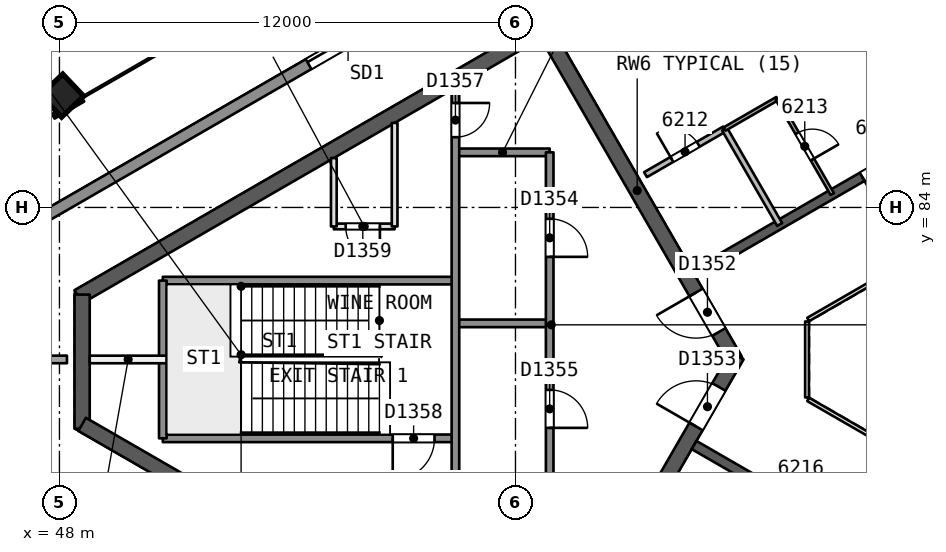
"""IFC4 building model, lengths in metres.
Left out: names, types, materials, properties, quantities, classifications, styles, units other than length and angle.
Written with IfcOpenShell. Run it as: python <this file> out.ifc"""

import sys

from ifc_helpers import new_model, si_unit, direction, frame, frame_2d, origin, origin_2d, place, context, subcontext, project, spatial, rectangle, extrude, element, fill, save


model = new_model("IFC4")
c1 = context("Model", 3, precision=1e-05, world=origin(), true_north=direction((0.0, 1.0)))
c2 = subcontext(c1, "Body", "Model", "MODEL_VIEW")
j1 = project(units=[si_unit("LENGTHUNIT", "METRE"), si_unit("PLANEANGLEUNIT", "RADIAN")], contexts=[c1])
p1 = place(None, origin())
s1 = spatial("IfcSite", under=j1, at=p1, CompositionType="ELEMENT")
p2 = place(p1, origin())
s2 = spatial("IfcBuilding", under=s1, at=p2, CompositionType="ELEMENT")
p3 = place(p2, frame((0.0, 0.0, 255.3)))
s3 = spatial("IfcBuildingStorey", under=s2, at=p3, CompositionType="ELEMENT", Elevation=255.3)
p4 = place(p3, frame((65.769, 80.0, 0.0), z_axis=(0.0, 0.0, 1.0), x_axis=(-0.50000177223, 0.866024380585, 0.0)))
e1 = element("IfcWall", 1, at=p4, inside=s3, PredefinedType="SHEAR", context=c2, shape_type="SweptSolid", body=[
    extrude(rectangle(XDim=10.265, YDim=0.4, at=frame_2d((5.132, 0.0))), origin(), (0.0, 0.0, 1.0), 3.7),
])
p5 = place(p4, frame((0.834, 0.0, 0.0)))
e2 = element("IfcOpeningElement", 2, at=p5, cuts=e1, PredefinedType="OPENING", context=c2, shape_type="SweptSolid", body=[
    extrude(rectangle(XDim=1.2, YDim=2.1, at=frame_2d((0.6, 1.05))), frame((0.0, 0.21, 0.0), z_axis=(0.0, -1.0, 0.0), x_axis=(1.0, 0.0, 0.0)), (0.0, 0.0, 1.0), 0.421),
])
p6 = place(p3, frame((60.737, 88.716, 0.0), z_axis=(0.0, 0.0, 1.0), x_axis=(-0.866028812667, -0.499994095595, 0.0)))
e3 = element("IfcWall", 3, at=p6, inside=s3, PredefinedType="SHEAR", context=c2, shape_type="SweptSolid", body=[
    extrude(rectangle(XDim=14.134, YDim=0.4, at=frame_2d((7.067, 0.0))), origin(), (0.0, 0.0, 1.0), 3.7),
])
p7 = place(p3, frame((48.597, 81.707, 0.0), z_axis=(0.0, 0.0, 1.0), x_axis=(0.0, -1.0, 0.0)))
e4 = element("IfcWall", 4, at=p7, inside=s3, PredefinedType="SHEAR", context=c2, shape_type="SweptSolid", body=[
    extrude(rectangle(XDim=3.53, YDim=0.4, at=frame_2d((1.765, 0.0))), origin(), (0.0, 0.0, 1.0), 3.7),
])
p8 = place(p3, frame((48.597, 78.293, 0.0), z_axis=(0.0, 0.0, 1.0), x_axis=(0.866026024469, -0.499998924941, 0.0)))
e5 = element("IfcWall", 5, at=p8, inside=s3, PredefinedType="SHEAR", context=c2, shape_type="SweptSolid", body=[
    extrude(rectangle(XDim=14.218, YDim=0.4, at=frame_2d((7.109, 0.0))), origin(), (0.0, 0.0, 1.0), 3.7),
])
p9 = place(p3, frame((60.737, 71.284, 0.0), z_axis=(0.0, 0.0, 1.0), x_axis=(0.50000547566, 0.866022242388, 0.0)))
e6 = element("IfcWall", 6, at=p9, inside=s3, PredefinedType="SHEAR", context=c2, shape_type="SweptSolid", body=[
    extrude(rectangle(XDim=10.18, YDim=0.4, at=frame_2d((5.09, 0.0))), origin(), (0.0, 0.0, 1.0), 3.7),
])
p10 = place(p9, frame((8.03, 0.0, 0.0)))
e7 = element("IfcOpeningElement", 7, at=p10, cuts=e6, PredefinedType="OPENING", context=c2, shape_type="SweptSolid", body=[
    extrude(rectangle(XDim=1.2, YDim=2.1, at=frame_2d((0.6, 1.05))), frame((0.0, 0.21, 0.0), z_axis=(0.0, -1.0, 0.0), x_axis=(1.0, 0.0, 0.0)), (0.0, 0.0, 1.0), 0.421),
])
p11 = place(p3, frame((78.2, 90.046, 0.0), z_axis=(0.0, 0.0, 1.0), x_axis=(-0.866026492143, -0.499998114903, 0.0)))
e8 = element("IfcWall", 8, at=p11, inside=s3, PredefinedType="SHEAR", context=c2, shape_type="SweptSolid", body=[
    extrude(rectangle(XDim=15.588, YDim=0.25, at=frame_2d((7.794, 0.0))), origin(), (0.0, 0.0, 1.0), 3.3),
])
p12 = place(p11, frame((5.887, 0.0, 0.0)))
e9 = element("IfcOpeningElement", 9, at=p12, cuts=e8, PredefinedType="OPENING", context=c2, shape_type="SweptSolid", body=[
    extrude(rectangle(XDim=1.0, YDim=2.1, at=frame_2d((0.5, 1.05))), frame((0.0, 0.135, 0.0), z_axis=(0.0, -1.0, 0.0), x_axis=(1.0, 0.0, 0.0)), (0.0, 0.0, 1.0), 0.271),
])
p13 = place(p11, frame((9.481, 0.0, 0.0)))
e10 = element("IfcOpeningElement", 10, at=p13, cuts=e8, PredefinedType="OPENING", context=c2, shape_type="SweptSolid", body=[
    extrude(rectangle(XDim=1.0, YDim=2.1, at=frame_2d((0.5, 1.05))), frame((0.0, 0.135, 0.0), z_axis=(0.0, -1.0, 0.0), x_axis=(1.0, 0.0, 0.0)), (0.0, 0.0, 1.0), 0.271),
])
p14 = place(p3, frame((64.7, 77.748, 0.0), z_axis=(0.0, 0.0, 1.0), x_axis=(0.866026492143, -0.499998114903, 0.0)))
e11 = element("IfcWall", 11, at=p14, inside=s3, PredefinedType="SHEAR", context=c2, shape_type="SweptSolid", body=[
    extrude(rectangle(XDim=15.588, YDim=0.25, at=frame_2d((7.794, 0.0))), origin(), (0.0, 0.0, 1.0), 3.3),
])
p15 = place(p14, frame((2.747, 0.0, 0.0)))
e12 = element("IfcOpeningElement", 12, at=p15, cuts=e11, PredefinedType="OPENING", context=c2, shape_type="SweptSolid", body=[
    extrude(rectangle(XDim=1.0, YDim=2.1, at=frame_2d((0.5, 1.05))), frame((0.0, 0.135, 0.0), z_axis=(0.0, -1.0, 0.0), x_axis=(1.0, 0.0, 0.0)), (0.0, 0.0, 1.0), 0.271),
])
p16 = place(p14, frame((6.544, 0.0, 0.0)))
e13 = element("IfcOpeningElement", 13, at=p16, cuts=e11, PredefinedType="OPENING", context=c2, shape_type="SweptSolid", body=[
    extrude(rectangle(XDim=1.0, YDim=2.1, at=frame_2d((0.5, 1.05))), frame((0.0, 0.135, 0.0), z_axis=(0.0, -1.0, 0.0), x_axis=(1.0, 0.0, 0.0)), (0.0, 0.0, 1.0), 0.271),
])
p17 = place(p14, frame((10.441, 0.0, 0.0)))
e14 = element("IfcOpeningElement", 14, at=p17, cuts=e11, PredefinedType="OPENING", context=c2, shape_type="SweptSolid", body=[
    extrude(rectangle(XDim=1.0, YDim=2.1, at=frame_2d((0.5, 1.05))), frame((0.0, 0.135, 0.0), z_axis=(0.0, -1.0, 0.0), x_axis=(1.0, 0.0, 0.0)), (0.0, 0.0, 1.0), 0.271),
])
p18 = place(p14, frame((11.841, 0.0, 0.0)))
e15 = element("IfcOpeningElement", 15, at=p18, cuts=e11, PredefinedType="OPENING", context=c2, shape_type="SweptSolid", body=[
    extrude(rectangle(XDim=1.0, YDim=2.1, at=frame_2d((0.5, 1.05))), frame((0.0, 0.135, 0.0), z_axis=(0.0, -1.0, 0.0), x_axis=(1.0, 0.0, 0.0)), (0.0, 0.0, 1.0), 0.271),
])
p19 = place(p3, frame((48.037, 86.951, 0.0), z_axis=(0.02855911485, -0.006793507689, 0.999569019734), x_axis=(-0.500407643461, 0.865554709988, 0.020180049142)))
e16 = element("IfcColumn", 16, at=p19, inside=s3, PredefinedType="COLUMN", context=c2, shape_type="SweptSolid", body=[
    extrude(rectangle(XDim=0.8, YDim=0.8, at=origin_2d()), origin(), (0.0, 0.0, 1.0), 3.702),
])
p20 = place(p3, frame((65.924, 94.162, 0.0), z_axis=(0.0, 0.0, 1.0), x_axis=(0.499987464755, -0.86603264089, 0.0)))
e17 = element("IfcWall", 17, at=p20, inside=s3, PredefinedType="PARTITIONING", context=c2, shape_type="SweptSolid", body=[
    extrude(rectangle(XDim=9.702, YDim=0.2, at=frame_2d((4.851, 0.0))), origin(), (0.0, 0.0, 1.0), 3.3),
])
p21 = place(p3, frame((63.422, 84.863, 0.0), z_axis=(0.0, 0.0, 1.0), x_axis=(0.865994240961, 0.500053971709, 0.0)))
e18 = element("IfcWall", 18, at=p21, inside=s3, PredefinedType="PARTITIONING", context=c2, shape_type="SweptSolid", body=[
    extrude(rectangle(XDim=2.401, YDim=0.15, at=frame_2d((1.201, 0.0))), origin(), (0.0, 0.0, 1.0), 3.3),
])
p22 = place(p21, frame((0.801, 0.0, 0.0)))
e19 = element("IfcOpeningElement", 19, at=p22, cuts=e18, PredefinedType="OPENING", context=c2, shape_type="SweptSolid", body=[
    extrude(rectangle(XDim=0.8, YDim=2.1, at=frame_2d((0.4, 1.05))), frame((0.0, 0.085, 0.0), z_axis=(0.0, -1.0, 0.0), x_axis=(1.0, 0.0, 0.0)), (0.0, 0.0, 1.0), 0.171),
])
p23 = place(p3, frame((65.502, 86.063, 0.0), z_axis=(0.0, 0.0, 1.0), x_axis=(0.866055983265, 0.499947031044, 0.0)))
e20 = element("IfcWall", 20, at=p23, inside=s3, PredefinedType="PARTITIONING", context=c2, shape_type="SweptSolid", body=[
    extrude(rectangle(XDim=1.6, YDim=0.1, at=frame_2d((0.8, 0.0))), origin(), (0.0, 0.0, 1.0), 3.3),
])
p24 = place(p3, frame((66.887, 86.863, 0.0), z_axis=(0.0, 0.0, 1.0), x_axis=(0.50005036918, -0.865996321171, 0.0)))
e21 = element("IfcWall", 21, at=p24, inside=s3, PredefinedType="PARTITIONING", context=c2, shape_type="SweptSolid", body=[
    extrude(rectangle(XDim=2.9, YDim=0.1, at=frame_2d((1.45, 0.0))), origin(), (0.0, 0.0, 1.0), 3.3),
])
p25 = place(p24, frame((1.05, 0.0, 0.0)))
e22 = element("IfcOpeningElement", 22, at=p25, cuts=e21, PredefinedType="OPENING", context=c2, shape_type="SweptSolid", body=[
    extrude(rectangle(XDim=0.8, YDim=2.1, at=frame_2d((0.4, 1.05))), frame((0.0, 0.061, 0.0), z_axis=(0.0, -1.0, 0.0), x_axis=(1.0, 0.0, 0.0)), (0.0, 0.0, 1.0), 0.121),
])
p26 = place(p3, frame((45.565, 80.001, 0.0), z_axis=(0.0, 0.0, 1.0), x_axis=(1.0, 0.0, 0.0)))
e23 = element("IfcWall", 23, at=p26, inside=s3, PredefinedType="PARTITIONING", context=c2, shape_type="SweptSolid", body=[
    extrude(rectangle(XDim=2.633, YDim=0.2, at=frame_2d((1.317, 0.0))), origin(), (0.0, 0.0, 1.0), 3.3),
])
p27 = place(p3, frame((66.952, 83.552, 0.0), z_axis=(0.0, 0.0, 1.0), x_axis=(-0.499987231761, 0.866032775405, 0.0)))
e24 = element("IfcWall", 24, at=p27, inside=s3, PredefinedType="PARTITIONING", context=c2, shape_type="SweptSolid", body=[
    extrude(rectangle(XDim=2.9, YDim=0.15, at=frame_2d((1.45, 0.0))), origin(), (0.0, 0.0, 1.0), 3.3),
])
p28 = place(p3, frame((45.416, 82.493, 0.0), z_axis=(0.0, 0.0, 1.0), x_axis=(0.866025373204, 0.500000052967, 0.0)))
e25 = element("IfcWall", 25, at=p28, inside=s3, PredefinedType="SOLIDWALL", context=c2, shape_type="SweptSolid", body=[
    extrude(rectangle(XDim=48.748, YDim=0.3, at=frame_2d((24.374, 0.0))), origin(), (0.0, 0.0, 1.0), 3.3),
])
p29 = place(p28, frame((35.015, 0.0, 0.0)))
e26 = element("IfcOpeningElement", 26, at=p29, cuts=e25, PredefinedType="OPENING", context=c2, shape_type="SweptSolid", body=[
    extrude(rectangle(XDim=2.4, YDim=2.4, at=frame_2d((1.2, 1.2))), frame((0.0, 0.161, 0.0), z_axis=(0.0, -1.0, 0.0), x_axis=(1.0, 0.0, 0.0)), (0.0, 0.0, 1.0), 0.321),
])
p30 = place(p28, frame((10.554, 0.0, 0.0)))
e27 = element("IfcOpeningElement", 27, at=p30, cuts=e25, PredefinedType="OPENING", context=c2, shape_type="SweptSolid", body=[
    extrude(rectangle(XDim=2.4, YDim=2.4, at=frame_2d((1.2, 1.2))), frame((0.0, 0.161, 0.0), z_axis=(0.0, -1.0, 0.0), x_axis=(1.0, 0.0, 0.0)), (0.0, 0.0, 1.0), 0.321),
])
p31 = place(p3, frame((87.633, 53.133, 0.0), z_axis=(0.0, 0.0, 1.0), x_axis=(-0.866025373204, 0.500000052967, 0.0)))
e28 = element("IfcWall", 28, at=p31, inside=s3, PredefinedType="SOLIDWALL", context=c2, shape_type="SweptSolid", body=[
    extrude(rectangle(XDim=48.748, YDim=0.3, at=frame_2d((24.374, 0.0))), origin(), (0.0, 0.0, 1.0), 3.3),
])
p32 = place(p31, frame((37.353, 0.0, 0.0)))
e29 = element("IfcOpeningElement", 29, at=p32, cuts=e28, PredefinedType="OPENING", context=c2, shape_type="SweptSolid", body=[
    extrude(rectangle(XDim=2.4, YDim=2.4, at=frame_2d((1.2, 1.2))), frame((0.0, 0.161, 0.0), z_axis=(0.0, -1.0, 0.0), x_axis=(1.0, 0.0, 0.0)), (0.0, 0.0, 1.0), 0.321),
])
p33 = place(p31, frame((8.995, 0.0, 0.0)))
e30 = element("IfcOpeningElement", 30, at=p33, cuts=e28, PredefinedType="OPENING", context=c2, shape_type="SweptSolid", body=[
    extrude(rectangle(XDim=2.4, YDim=2.4, at=frame_2d((1.2, 1.2))), frame((0.0, 0.161, 0.0), z_axis=(0.0, -1.0, 0.0), x_axis=(1.0, 0.0, 0.0)), (0.0, 0.0, 1.0), 0.321),
])
p34 = place(p31, frame((25.123, 0.0, 0.0)))
e31 = element("IfcOpeningElement", 31, at=p34, cuts=e28, PredefinedType="OPENING", context=c2, shape_type="SweptSolid", body=[
    extrude(rectangle(XDim=2.4, YDim=2.4, at=frame_2d((1.2, 1.2))), frame((0.0, 0.161, 0.0), z_axis=(0.0, -1.0, 0.0), x_axis=(1.0, 0.0, 0.0)), (0.0, 0.0, 1.0), 0.321),
])
p35 = place(p31, frame((21.226, 0.0, 0.0)))
e32 = element("IfcOpeningElement", 32, at=p35, cuts=e28, PredefinedType="OPENING", context=c2, shape_type="SweptSolid", body=[
    extrude(rectangle(XDim=2.4, YDim=2.4, at=frame_2d((1.2, 1.2))), frame((0.0, 0.161, 0.0), z_axis=(0.0, -1.0, 0.0), x_axis=(1.0, 0.0, 0.0)), (0.0, 0.0, 1.0), 0.321),
])
p36 = place(p3, frame((60.9, 85.45, 0.0), z_axis=(0.0, 0.0, 1.0), x_axis=(-1.0, 0.0, 0.0)))
e33 = element("IfcWall", 33, at=p36, inside=s3, PredefinedType="SOLIDWALL", context=c2, shape_type="SweptSolid", body=[
    extrude(rectangle(XDim=2.48, YDim=0.2, at=frame_2d((1.24, 0.0))), origin(), (0.0, 0.0, 1.0), 3.3),
])
p37 = place(p3, frame((56.82, 83.5, 0.0), z_axis=(0.0, 0.0, 1.0), x_axis=(-1.0, 0.0, 0.0)))
e34 = element("IfcWall", 34, at=p37, inside=s3, PredefinedType="PARTITIONING", context=c2, shape_type="SweptSolid", body=[
    extrude(rectangle(XDim=1.6, YDim=0.15, at=frame_2d((0.8, 0.0))), origin(), (0.0, 0.0, 1.0), 3.3),
])
p38 = place(p37, frame((0.387, 0.0, 0.0)))
e35 = element("IfcOpeningElement", 35, at=p38, cuts=e34, PredefinedType="OPENING", context=c2, shape_type="SweptSolid", body=[
    extrude(rectangle(XDim=0.9, YDim=2.1, at=frame_2d((0.45, 1.05))), frame((0.0, 0.085, 0.0), z_axis=(0.0, -1.0, 0.0), x_axis=(1.0, 0.0, 0.0)), (0.0, 0.0, 1.0), 0.171),
])
p39 = place(p3, frame((58.42, 82.075, 0.0), z_axis=(0.0, 0.0, 1.0), x_axis=(-1.0, 0.0, 0.0)))
e36 = element("IfcWall", 36, at=p39, inside=s3, PredefinedType="SOLIDWALL", context=c2, shape_type="SweptSolid", body=[
    extrude(rectangle(XDim=7.7, YDim=0.2, at=frame_2d((3.85, 0.0))), origin(), (0.0, 0.0, 1.0), 3.3),
])
p40 = place(p3, frame((60.9, 80.95, 0.0), z_axis=(0.0, 0.0, 1.0), x_axis=(-1.0, 0.0, 0.0)))
e37 = element("IfcWall", 37, at=p40, inside=s3, PredefinedType="SOLIDWALL", context=c2, shape_type="SweptSolid", body=[
    extrude(rectangle(XDim=2.48, YDim=0.2, at=frame_2d((1.24, 0.0))), origin(), (0.0, 0.0, 1.0), 3.3),
])
p41 = place(p3, frame((50.82, 80.0, 0.0), z_axis=(0.0, 0.0, 1.0), x_axis=(-1.0, 0.0, 0.0)))
e38 = element("IfcWall", 38, at=p41, inside=s3, PredefinedType="PARTITIONING", context=c2, shape_type="SweptSolid", body=[
    extrude(rectangle(XDim=2.023, YDim=0.2, at=frame_2d((1.012, 0.0))), origin(), (0.0, 0.0, 1.0), 3.3),
])
p42 = place(p3, frame((58.42, 77.925, 0.0), z_axis=(0.0, 0.0, 1.0), x_axis=(-1.0, 0.0, 0.0)))
e39 = element("IfcWall", 39, at=p42, inside=s3, PredefinedType="SOLIDWALL", context=c2, shape_type="SweptSolid", body=[
    extrude(rectangle(XDim=7.7, YDim=0.2, at=frame_2d((3.85, 0.0))), origin(), (0.0, 0.0, 1.0), 3.3),
])
p43 = place(p42, frame((0.55, 0.0, 0.0)))
e40 = element("IfcOpeningElement", 40, at=p43, cuts=e39, PredefinedType="OPENING", context=c2, shape_type="SweptSolid", body=[
    extrude(rectangle(XDim=1.1, YDim=2.1, at=frame_2d((0.55, 1.05))), frame((0.0, 0.11, 0.0), z_axis=(0.0, -1.0, 0.0), x_axis=(1.0, 0.0, 0.0)), (0.0, 0.0, 1.0), 0.221),
])
p44 = place(p3, frame((60.9, 85.45, 0.0), z_axis=(0.0, 0.0, 1.0), x_axis=(0.0, -1.0, 0.0)))
e41 = element("IfcWall", 41, at=p44, inside=s3, PredefinedType="SOLIDWALL", context=c2, shape_type="SweptSolid", body=[
    extrude(rectangle(XDim=10.9, YDim=0.2, at=frame_2d((5.45, 0.0))), origin(), (0.0, 0.0, 1.0), 3.3),
])
p45 = place(p44, frame((1.75, 0.0, 0.0)))
e42 = element("IfcOpeningElement", 42, at=p45, cuts=e41, PredefinedType="OPENING", context=c2, shape_type="SweptSolid", body=[
    extrude(rectangle(XDim=1.0, YDim=2.1, at=frame_2d((0.5, 1.05))), frame((0.0, 0.11, 0.0), z_axis=(0.0, -1.0, 0.0), x_axis=(1.0, 0.0, 0.0)), (0.0, 0.0, 1.0), 0.221),
])
p46 = place(p44, frame((6.25, 0.0, 0.0)))
e43 = element("IfcOpeningElement", 43, at=p46, cuts=e41, PredefinedType="OPENING", context=c2, shape_type="SweptSolid", body=[
    extrude(rectangle(XDim=1.0, YDim=2.1, at=frame_2d((0.5, 1.05))), frame((0.0, 0.11, 0.0), z_axis=(0.0, -1.0, 0.0), x_axis=(1.0, 0.0, 0.0)), (0.0, 0.0, 1.0), 0.221),
])
p47 = place(p3, frame((58.42, 87.148, 0.0), z_axis=(0.0, 0.0, 1.0), x_axis=(0.0, -1.0, 0.0)))
e44 = element("IfcWall", 44, at=p47, inside=s3, PredefinedType="SOLIDWALL", context=c2, shape_type="SweptSolid", body=[
    extrude(rectangle(XDim=10.698, YDim=0.2, at=frame_2d((5.349, 0.0))), origin(), (0.0, 0.0, 1.0), 3.3),
])
p48 = place(p47, frame((0.399, 0.0, 0.0)))
e45 = element("IfcOpeningElement", 45, at=p48, cuts=e44, PredefinedType="OPENING", context=c2, shape_type="SweptSolid", body=[
    extrude(rectangle(XDim=0.9, YDim=2.1, at=frame_2d((0.45, 1.05))), frame((0.0, 0.11, 0.0), z_axis=(0.0, -1.0, 0.0), x_axis=(1.0, 0.0, 0.0)), (0.0, 0.0, 1.0), 0.221),
])
p49 = place(p3, frame((56.82, 86.224, 0.0), z_axis=(0.0, 0.0, 1.0), x_axis=(0.0, -1.0, 0.0)))
e46 = element("IfcWall", 46, at=p49, inside=s3, PredefinedType="PARTITIONING", context=c2, shape_type="SweptSolid", body=[
    extrude(rectangle(XDim=2.724, YDim=0.15, at=frame_2d((1.362, 0.0))), origin(), (0.0, 0.0, 1.0), 3.3),
])
p50 = place(p3, frame((55.22, 85.3, 0.0), z_axis=(0.0, 0.0, 1.0), x_axis=(0.0, -1.0, 0.0)))
e47 = element("IfcWall", 47, at=p50, inside=s3, PredefinedType="PARTITIONING", context=c2, shape_type="SweptSolid", body=[
    extrude(rectangle(XDim=1.8, YDim=0.15, at=frame_2d((0.9, 0.0))), origin(), (0.0, 0.0, 1.0), 3.3),
])
p51 = place(p3, frame((50.72, 82.075, 0.0), z_axis=(0.0, 0.0, 1.0), x_axis=(0.0, -1.0, 0.0)))
e48 = element("IfcWall", 48, at=p51, inside=s3, PredefinedType="SOLIDWALL", context=c2, shape_type="SweptSolid", body=[
    extrude(rectangle(XDim=4.15, YDim=0.2, at=frame_2d((2.075, 0.0))), origin(), (0.0, 0.0, 1.0), 3.3),
])
p52 = place(p3, frame((77.738, 86.846, 0.0), z_axis=(0.0, 0.0, 1.0), x_axis=(-0.866026658274, -0.499997827154, 0.0)))
e49 = element("IfcWall", 49, at=p52, inside=s3, PredefinedType="PARTITIONING", context=c2, shape_type="SweptSolid", body=[
    extrude(rectangle(XDim=11.588, YDim=0.1, at=frame_2d((5.794, 0.0))), origin(), (0.0, 0.0, 1.0), 3.3),
])
p53 = place(p3, frame((67.672, 81.0, 0.0), z_axis=(0.0, 0.0, 1.0), x_axis=(0.0, -1.0, 0.0)))
e50 = element("IfcWall", 50, at=p53, inside=s3, PredefinedType="PARTITIONING", context=c2, shape_type="SweptSolid", body=[
    extrude(rectangle(XDim=2.0, YDim=0.1, at=frame_2d((1.0, 0.0))), origin(), (0.0, 0.0, 1.0), 3.3),
])
p54 = place(p3, frame((67.702, 78.948, 0.0), z_axis=(0.0, 0.0, 1.0), x_axis=(0.866026658274, -0.499997827154, 0.0)))
e51 = element("IfcWall", 51, at=p54, inside=s3, PredefinedType="PARTITIONING", context=c2, shape_type="SweptSolid", body=[
    extrude(rectangle(XDim=11.588, YDim=0.1, at=frame_2d((5.794, 0.0))), origin(), (0.0, 0.0, 1.0), 3.3),
])
p55 = place(p22, origin())
e52 = element("IfcDoor", 52, at=p55, inside=s3, OperationType="SINGLE_SWING_LEFT", PredefinedType="NOTDEFINED", context=c2, shape_type="SweptSolid", body=[
    extrude(rectangle(XDim=0.8, YDim=2.1, at=frame_2d((0.4, 1.05))), frame((0.0, 0.025, 0.0), z_axis=(0.0, -1.0, 0.0), x_axis=(1.0, 0.0, 0.0)), (0.0, 0.0, 1.0), 0.05),
])
fill(e19, e52)
p56 = place(p25, origin())
e53 = element("IfcDoor", 53, at=p56, inside=s3, OperationType="SINGLE_SWING_RIGHT", PredefinedType="NOTDEFINED", context=c2, shape_type="SweptSolid", body=[
    extrude(rectangle(XDim=0.8, YDim=2.1, at=frame_2d((0.4, 1.05))), frame((0.0, 0.025, 0.0), z_axis=(0.0, -1.0, 0.0), x_axis=(1.0, 0.0, 0.0)), (0.0, 0.0, 1.0), 0.05),
])
fill(e22, e53)
p57 = place(p13, origin())
e54 = element("IfcDoor", 54, at=p57, inside=s3, OperationType="SINGLE_SWING_RIGHT", PredefinedType="NOTDEFINED", context=c2, shape_type="SweptSolid", body=[
    extrude(rectangle(XDim=1.0, YDim=2.1, at=frame_2d((0.5, 1.05))), frame((0.0, 0.025, 0.0), z_axis=(0.0, -1.0, 0.0), x_axis=(1.0, 0.0, 0.0)), (0.0, 0.0, 1.0), 0.05),
])
fill(e10, e54)
p58 = place(p30, origin())
e55 = element("IfcDoor", 55, at=p58, inside=s3, OperationType="SLIDING_TO_RIGHT", PredefinedType="NOTDEFINED", context=c2, shape_type="SweptSolid", body=[
    extrude(rectangle(XDim=2.4, YDim=2.4, at=frame_2d((1.2, 1.2))), frame((0.0, 0.025, 0.0), z_axis=(0.0, -1.0, 0.0), x_axis=(1.0, 0.0, 0.0)), (0.0, 0.0, 1.0), 0.05),
])
fill(e27, e55)
p59 = place(p5, origin())
e56 = element("IfcDoor", 56, at=p59, inside=s3, OperationType="SINGLE_SWING_RIGHT", PredefinedType="NOTDEFINED", context=c2, shape_type="SweptSolid", body=[
    extrude(rectangle(XDim=1.2, YDim=2.1, at=frame_2d((0.6, 1.05))), frame((0.0, 0.025, 0.0), z_axis=(0.0, -1.0, 0.0), x_axis=(1.0, 0.0, 0.0)), (0.0, 0.0, 1.0), 0.05),
])
fill(e2, e56)
p60 = place(p10, origin())
e57 = element("IfcDoor", 57, at=p60, inside=s3, OperationType="SINGLE_SWING_LEFT", PredefinedType="NOTDEFINED", context=c2, shape_type="SweptSolid", body=[
    extrude(rectangle(XDim=1.2, YDim=2.1, at=frame_2d((0.6, 1.05))), frame((0.0, 0.025, 0.0), z_axis=(0.0, -1.0, 0.0), x_axis=(1.0, 0.0, 0.0)), (0.0, 0.0, 1.0), 0.05),
])
fill(e7, e57)
p61 = place(p45, origin())
e58 = element("IfcDoor", 58, at=p61, inside=s3, OperationType="SINGLE_SWING_RIGHT", PredefinedType="NOTDEFINED", context=c2, shape_type="SweptSolid", body=[
    extrude(rectangle(XDim=1.0, YDim=2.1, at=frame_2d((0.5, 1.05))), frame((0.0, 0.025, 0.0), z_axis=(0.0, -1.0, 0.0), x_axis=(1.0, 0.0, 0.0)), (0.0, 0.0, 1.0), 0.05),
])
fill(e42, e58)
p62 = place(p46, origin())
e59 = element("IfcDoor", 59, at=p62, inside=s3, OperationType="SINGLE_SWING_RIGHT", PredefinedType="NOTDEFINED", context=c2, shape_type="SweptSolid", body=[
    extrude(rectangle(XDim=1.0, YDim=2.1, at=frame_2d((0.5, 1.05))), frame((0.0, 0.025, 0.0), z_axis=(0.0, -1.0, 0.0), x_axis=(1.0, 0.0, 0.0)), (0.0, 0.0, 1.0), 0.05),
])
fill(e43, e59)
p63 = place(p48, origin())
e60 = element("IfcDoor", 60, at=p63, inside=s3, OperationType="SINGLE_SWING_LEFT", PredefinedType="NOTDEFINED", context=c2, shape_type="SweptSolid", body=[
    extrude(rectangle(XDim=0.9, YDim=2.1, at=frame_2d((0.45, 1.05))), frame((0.0, 0.025, 0.0), z_axis=(0.0, -1.0, 0.0), x_axis=(1.0, 0.0, 0.0)), (0.0, 0.0, 1.0), 0.05),
])
fill(e45, e60)
p64 = place(p43, origin())
e61 = element("IfcDoor", 61, at=p64, inside=s3, OperationType="SINGLE_SWING_RIGHT", PredefinedType="NOTDEFINED", context=c2, shape_type="SweptSolid", body=[
    extrude(rectangle(XDim=1.1, YDim=2.1, at=frame_2d((0.55, 1.05))), frame((0.0, 0.025, 0.0), z_axis=(0.0, -1.0, 0.0), x_axis=(1.0, 0.0, 0.0)), (0.0, 0.0, 1.0), 0.05),
])
fill(e40, e61)
p65 = place(p38, origin())
e62 = element("IfcDoor", 62, at=p65, inside=s3, OperationType="SINGLE_SWING_LEFT", PredefinedType="NOTDEFINED", context=c2, shape_type="SweptSolid", body=[
    extrude(rectangle(XDim=0.9, YDim=2.1, at=frame_2d((0.45, 1.05))), frame((0.0, 0.025, 0.0), z_axis=(0.0, -1.0, 0.0), x_axis=(1.0, 0.0, 0.0)), (0.0, 0.0, 1.0), 0.05),
])
fill(e35, e62)
save(model, sys.argv[1])
